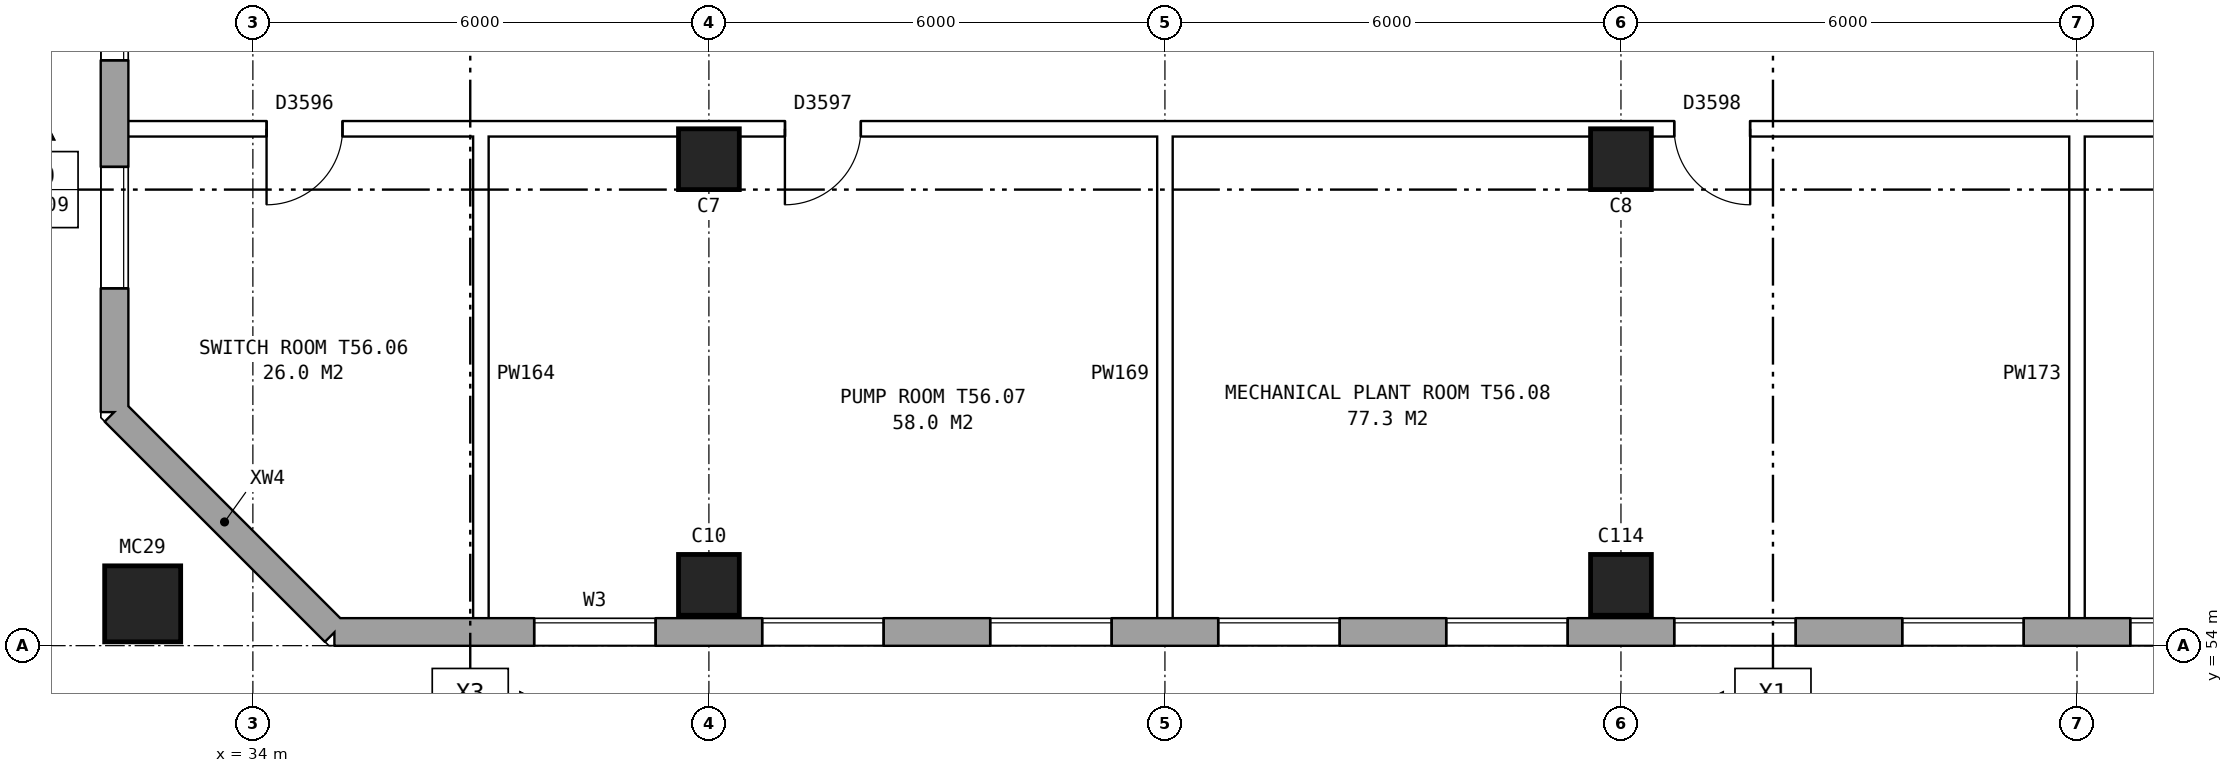
"""IFC4 building model, lengths in metres.
Left out: names, types, materials, properties, quantities, classifications, styles, units other than length and angle.
Written with IfcOpenShell. Run it as: python <this file> out.ifc"""

import sys

from ifc_helpers import new_model, si_unit, direction, frame, frame_2d, origin, origin_2d, place, context, subcontext, project, spatial, rectangle, hollow_rectangle, extrude, element, fill, save


model = new_model("IFC4")
c1 = context("Model", 3, precision=1e-05, world=origin(), true_north=direction((0.0, 1.0)))
c2 = subcontext(c1, "Body", "Model", "MODEL_VIEW")
j1 = project(units=[si_unit("LENGTHUNIT", "METRE"), si_unit("PLANEANGLEUNIT", "RADIAN")], contexts=[c1])
p1 = place(None, origin())
s1 = spatial("IfcSite", under=j1, at=p1, CompositionType="ELEMENT")
p2 = place(p1, origin())
s2 = spatial("IfcBuilding", under=s1, at=p2, CompositionType="ELEMENT")
p3 = place(p2, frame((0.0, 0.0, 198.6)))
s3 = spatial("IfcBuildingStorey", under=s2, at=p3, CompositionType="ELEMENT", Elevation=198.6)
for number, where, z_axis, x_axis in (
    (1, (40.0, 54.8, 0.0), (0.0, 0.0, 1.0), (1.0, 0.0, 0.0)),
    (2, (40.0, 60.4, 0.0), (0.0, 0.0, 1.0), (1.0, 0.0, 0.0)),
    (3, (52.0, 54.8, 0.0), (0.0, 0.0, 1.0), (1.0, 0.0, 0.0)),
    (4, (52.0, 60.4, 0.0), (0.0, 0.0, 1.0), (1.0, 0.0, 0.0)),
):
    element("IfcColumn", number, at=place(p3, frame(where, z_axis=z_axis, x_axis=x_axis)), inside=s3, PredefinedType="COLUMN", context=c2, shape_type="SweptSolid", body=[
        extrude(rectangle(XDim=0.8, YDim=0.8, at=origin_2d()), origin(), (0.0, 0.0, 1.0), 3.7),
    ])
p4 = place(p3, frame((32.55, 54.55, 0.0), z_axis=(0.0, 0.0, 1.0), x_axis=(1.0, 0.0, 0.0)))
e5 = element("IfcColumn", 5, at=p4, inside=s3, PredefinedType="COLUMN", context=c2, shape_type="SweptSolid", body=[
    extrude(hollow_rectangle(XDim=1.0, YDim=1.0, WallThickness=0.055, at=origin_2d()), origin(), (0.0, 0.0, 1.0), 4.2),
])
p5 = place(p3, frame((32.18, 57.075, 0.0), z_axis=(0.0, 0.0, 1.0), x_axis=(0.707106781187, -0.707106781187, 0.0)))
e6 = element("IfcWall", 6, at=p5, inside=s3, PredefinedType="STANDARD", context=c2, shape_type="SweptSolid", body=[
    extrude(rectangle(XDim=4.094, YDim=0.36, at=frame_2d((2.047, 0.0))), origin(), (0.0, 0.0, 1.0), 3.7),
])
p6 = place(p3, frame((35.075, 54.18, 0.0), z_axis=(0.0, 0.0, 1.0), x_axis=(1.0, 0.0, 0.0)))
e7 = element("IfcWall", 7, at=p6, inside=s3, PredefinedType="STANDARD", context=c2, shape_type="SweptSolid", body=[
    extrude(rectangle(XDim=39.875, YDim=0.36, at=frame_2d((19.938, 0.0))), origin(), (0.0, 0.0, 1.0), 3.7),
])
p7 = place(p6, frame((2.625, 0.0, 1.5)))
e8 = element("IfcOpeningElement", 8, at=p7, cuts=e7, PredefinedType="OPENING", context=c2, shape_type="SweptSolid", body=[
    extrude(rectangle(XDim=1.6, YDim=1.2, at=frame_2d((0.8, 0.6))), frame((0.0, 0.19, 0.0), z_axis=(0.0, -1.0, 0.0), x_axis=(1.0, 0.0, 0.0)), (0.0, 0.0, 1.0), 0.38),
])
p8 = place(p6, frame((5.625, 0.0, 1.5)))
e9 = element("IfcOpeningElement", 9, at=p8, cuts=e7, PredefinedType="OPENING", context=c2, shape_type="SweptSolid", body=[
    extrude(rectangle(XDim=1.6, YDim=1.2, at=frame_2d((0.8, 0.6))), frame((0.0, 0.19, 0.0), z_axis=(0.0, -1.0, 0.0), x_axis=(1.0, 0.0, 0.0)), (0.0, 0.0, 1.0), 0.38),
])
p9 = place(p6, frame((8.625, 0.0, 1.5)))
e10 = element("IfcOpeningElement", 10, at=p9, cuts=e7, PredefinedType="OPENING", context=c2, shape_type="SweptSolid", body=[
    extrude(rectangle(XDim=1.6, YDim=1.2, at=frame_2d((0.8, 0.6))), frame((0.0, 0.19, 0.0), z_axis=(0.0, -1.0, 0.0), x_axis=(1.0, 0.0, 0.0)), (0.0, 0.0, 1.0), 0.38),
])
p10 = place(p6, frame((11.625, 0.0, 1.5)))
e11 = element("IfcOpeningElement", 11, at=p10, cuts=e7, PredefinedType="OPENING", context=c2, shape_type="SweptSolid", body=[
    extrude(rectangle(XDim=1.6, YDim=1.2, at=frame_2d((0.8, 0.6))), frame((0.0, 0.19, 0.0), z_axis=(0.0, -1.0, 0.0), x_axis=(1.0, 0.0, 0.0)), (0.0, 0.0, 1.0), 0.38),
])
p11 = place(p6, frame((14.625, 0.0, 1.5)))
e12 = element("IfcOpeningElement", 12, at=p11, cuts=e7, PredefinedType="OPENING", context=c2, shape_type="SweptSolid", body=[
    extrude(rectangle(XDim=1.6, YDim=1.2, at=frame_2d((0.8, 0.6))), frame((0.0, 0.19, 0.0), z_axis=(0.0, -1.0, 0.0), x_axis=(1.0, 0.0, 0.0)), (0.0, 0.0, 1.0), 0.38),
])
p12 = place(p6, frame((17.625, 0.0, 1.5)))
e13 = element("IfcOpeningElement", 13, at=p12, cuts=e7, PredefinedType="OPENING", context=c2, shape_type="SweptSolid", body=[
    extrude(rectangle(XDim=1.6, YDim=1.2, at=frame_2d((0.8, 0.6))), frame((0.0, 0.19, 0.0), z_axis=(0.0, -1.0, 0.0), x_axis=(1.0, 0.0, 0.0)), (0.0, 0.0, 1.0), 0.38),
])
p13 = place(p6, frame((20.625, 0.0, 1.5)))
e14 = element("IfcOpeningElement", 14, at=p13, cuts=e7, PredefinedType="OPENING", context=c2, shape_type="SweptSolid", body=[
    extrude(rectangle(XDim=1.6, YDim=1.2, at=frame_2d((0.8, 0.6))), frame((0.0, 0.19, 0.0), z_axis=(0.0, -1.0, 0.0), x_axis=(1.0, 0.0, 0.0)), (0.0, 0.0, 1.0), 0.38),
])
p14 = place(p6, frame((23.625, 0.0, 1.5)))
e15 = element("IfcOpeningElement", 15, at=p14, cuts=e7, PredefinedType="OPENING", context=c2, shape_type="SweptSolid", body=[
    extrude(rectangle(XDim=1.6, YDim=1.2, at=frame_2d((0.8, 0.6))), frame((0.0, 0.19, 0.0), z_axis=(0.0, -1.0, 0.0), x_axis=(1.0, 0.0, 0.0)), (0.0, 0.0, 1.0), 0.38),
])
p15 = place(p6, frame((26.625, 0.0, 1.5)))
e16 = element("IfcOpeningElement", 16, at=p15, cuts=e7, PredefinedType="OPENING", context=c2, shape_type="SweptSolid", body=[
    extrude(rectangle(XDim=1.6, YDim=1.2, at=frame_2d((0.8, 0.6))), frame((0.0, 0.19, 0.0), z_axis=(0.0, -1.0, 0.0), x_axis=(1.0, 0.0, 0.0)), (0.0, 0.0, 1.0), 0.38),
])
p16 = place(p6, frame((29.625, 0.0, 1.5)))
e17 = element("IfcOpeningElement", 17, at=p16, cuts=e7, PredefinedType="OPENING", context=c2, shape_type="SweptSolid", body=[
    extrude(rectangle(XDim=1.6, YDim=1.2, at=frame_2d((0.8, 0.6))), frame((0.0, 0.19, 0.0), z_axis=(0.0, -1.0, 0.0), x_axis=(1.0, 0.0, 0.0)), (0.0, 0.0, 1.0), 0.38),
])
p17 = place(p6, frame((32.625, 0.0, 1.5)))
e18 = element("IfcOpeningElement", 18, at=p17, cuts=e7, PredefinedType="OPENING", context=c2, shape_type="SweptSolid", body=[
    extrude(rectangle(XDim=1.6, YDim=1.2, at=frame_2d((0.8, 0.6))), frame((0.0, 0.19, 0.0), z_axis=(0.0, -1.0, 0.0), x_axis=(1.0, 0.0, 0.0)), (0.0, 0.0, 1.0), 0.38),
])
p18 = place(p6, frame((35.625, 0.0, 1.5)))
e19 = element("IfcOpeningElement", 19, at=p18, cuts=e7, PredefinedType="OPENING", context=c2, shape_type="SweptSolid", body=[
    extrude(rectangle(XDim=1.6, YDim=1.2, at=frame_2d((0.8, 0.6))), frame((0.0, 0.19, 0.0), z_axis=(0.0, -1.0, 0.0), x_axis=(1.0, 0.0, 0.0)), (0.0, 0.0, 1.0), 0.38),
])
p19 = place(p3, frame((32.18, 82.925, 0.0), z_axis=(0.0, 0.0, 1.0), x_axis=(0.0, -1.0, 0.0)))
e20 = element("IfcWall", 20, at=p19, inside=s3, PredefinedType="STANDARD", context=c2, shape_type="SweptSolid", body=[
    extrude(rectangle(XDim=25.851, YDim=0.36, at=frame_2d((12.925, 0.0))), origin(), (0.0, 0.0, 1.0), 3.7),
])
p20 = place(p19, frame((1.625, 0.0, 1.5)))
e21 = element("IfcOpeningElement", 21, at=p20, cuts=e20, PredefinedType="OPENING", context=c2, shape_type="SweptSolid", body=[
    extrude(rectangle(XDim=1.6, YDim=1.2, at=frame_2d((0.8, 0.6))), frame((0.0, 0.19, 0.0), z_axis=(0.0, -1.0, 0.0), x_axis=(1.0, 0.0, 0.0)), (0.0, 0.0, 1.0), 0.38),
])
p21 = place(p19, frame((4.625, 0.0, 1.5)))
e22 = element("IfcOpeningElement", 22, at=p21, cuts=e20, PredefinedType="OPENING", context=c2, shape_type="SweptSolid", body=[
    extrude(rectangle(XDim=1.6, YDim=1.2, at=frame_2d((0.8, 0.6))), frame((0.0, 0.19, 0.0), z_axis=(0.0, -1.0, 0.0), x_axis=(1.0, 0.0, 0.0)), (0.0, 0.0, 1.0), 0.38),
])
p22 = place(p19, frame((19.625, 0.0, 1.5)))
e23 = element("IfcOpeningElement", 23, at=p22, cuts=e20, PredefinedType="OPENING", context=c2, shape_type="SweptSolid", body=[
    extrude(rectangle(XDim=1.6, YDim=1.2, at=frame_2d((0.8, 0.6))), frame((0.0, 0.19, 0.0), z_axis=(0.0, -1.0, 0.0), x_axis=(1.0, 0.0, 0.0)), (0.0, 0.0, 1.0), 0.38),
])
p23 = place(p19, frame((22.625, 0.0, 1.5)))
e24 = element("IfcOpeningElement", 24, at=p23, cuts=e20, PredefinedType="OPENING", context=c2, shape_type="SweptSolid", body=[
    extrude(rectangle(XDim=1.6, YDim=1.2, at=frame_2d((0.8, 0.6))), frame((0.0, 0.19, 0.0), z_axis=(0.0, -1.0, 0.0), x_axis=(1.0, 0.0, 0.0)), (0.0, 0.0, 1.0), 0.38),
])
p24 = place(p3, frame((32.24, 60.8, 0.0), z_axis=(0.0, 0.0, 1.0), x_axis=(1.0, 0.0, 0.0)))
e25 = element("IfcWall", 25, at=p24, inside=s3, PredefinedType="PARTITIONING", context=c2, shape_type="SweptSolid", body=[
    extrude(rectangle(XDim=136.52, YDim=0.2, at=frame_2d((68.26, 0.0))), origin(), (0.0, 0.0, 1.0), 3.7),
])
p25 = place(p24, frame((1.94, 0.0, 0.0)))
e26 = element("IfcOpeningElement", 26, at=p25, cuts=e25, PredefinedType="OPENING", context=c2, shape_type="SweptSolid", body=[
    extrude(rectangle(XDim=1.0, YDim=2.1, at=frame_2d((0.5, 1.05))), frame((0.0, 0.11, 0.0), z_axis=(0.0, -1.0, 0.0), x_axis=(1.0, 0.0, 0.0)), (0.0, 0.0, 1.0), 0.22),
])
p26 = place(p24, frame((8.76, 0.0, 0.0)))
e27 = element("IfcOpeningElement", 27, at=p26, cuts=e25, PredefinedType="OPENING", context=c2, shape_type="SweptSolid", body=[
    extrude(rectangle(XDim=1.0, YDim=2.1, at=frame_2d((0.5, 1.05))), frame((0.0, 0.11, 0.0), z_axis=(0.0, -1.0, 0.0), x_axis=(1.0, 0.0, 0.0)), (0.0, 0.0, 1.0), 0.22),
])
p27 = place(p24, frame((20.46, 0.0, 0.0)))
e28 = element("IfcOpeningElement", 28, at=p27, cuts=e25, PredefinedType="OPENING", context=c2, shape_type="SweptSolid", body=[
    extrude(rectangle(XDim=1.0, YDim=2.1, at=frame_2d((0.5, 1.05))), frame((0.0, 0.11, 0.0), z_axis=(0.0, -1.0, 0.0), x_axis=(1.0, 0.0, 0.0)), (0.0, 0.0, 1.0), 0.22),
])
p28 = place(p24, frame((30.06, 0.0, 0.0)))
e29 = element("IfcOpeningElement", 29, at=p28, cuts=e25, PredefinedType="OPENING", context=c2, shape_type="SweptSolid", body=[
    extrude(rectangle(XDim=1.0, YDim=2.1, at=frame_2d((0.5, 1.05))), frame((0.0, 0.11, 0.0), z_axis=(0.0, -1.0, 0.0), x_axis=(1.0, 0.0, 0.0)), (0.0, 0.0, 1.0), 0.22),
])
p29 = place(p24, frame((40.08, 0.0, 0.0)))
e30 = element("IfcOpeningElement", 30, at=p29, cuts=e25, PredefinedType="OPENING", context=c2, shape_type="SweptSolid", body=[
    extrude(rectangle(XDim=1.0, YDim=2.1, at=frame_2d((0.5, 1.05))), frame((0.0, 0.11, 0.0), z_axis=(0.0, -1.0, 0.0), x_axis=(1.0, 0.0, 0.0)), (0.0, 0.0, 1.0), 0.22),
])
p30 = place(p24, frame((46.517, 0.0, 0.0)))
e31 = element("IfcOpeningElement", 31, at=p30, cuts=e25, PredefinedType="OPENING", context=c2, shape_type="SweptSolid", body=[
    extrude(rectangle(XDim=1.0, YDim=2.1, at=frame_2d((0.5, 1.05))), frame((0.0, 0.11, 0.0), z_axis=(0.0, -1.0, 0.0), x_axis=(1.0, 0.0, 0.0)), (0.0, 0.0, 1.0), 0.22),
])
p31 = place(p24, frame((57.01, 0.0, 0.0)))
e32 = element("IfcOpeningElement", 32, at=p31, cuts=e25, PredefinedType="OPENING", context=c2, shape_type="SweptSolid", body=[
    extrude(rectangle(XDim=1.0, YDim=2.1, at=frame_2d((0.5, 1.05))), frame((0.0, 0.11, 0.0), z_axis=(0.0, -1.0, 0.0), x_axis=(1.0, 0.0, 0.0)), (0.0, 0.0, 1.0), 0.22),
])
p32 = place(p24, frame((70.76, 0.0, 0.0)))
e33 = element("IfcOpeningElement", 33, at=p32, cuts=e25, PredefinedType="OPENING", context=c2, shape_type="SweptSolid", body=[
    extrude(rectangle(XDim=1.0, YDim=2.1, at=frame_2d((0.5, 1.05))), frame((0.0, 0.11, 0.0), z_axis=(0.0, -1.0, 0.0), x_axis=(1.0, 0.0, 0.0)), (0.0, 0.0, 1.0), 0.22),
])
p33 = place(p24, frame((84.51, 0.0, 0.0)))
e34 = element("IfcOpeningElement", 34, at=p33, cuts=e25, PredefinedType="OPENING", context=c2, shape_type="SweptSolid", body=[
    extrude(rectangle(XDim=1.0, YDim=2.1, at=frame_2d((0.5, 1.05))), frame((0.0, 0.11, 0.0), z_axis=(0.0, -1.0, 0.0), x_axis=(1.0, 0.0, 0.0)), (0.0, 0.0, 1.0), 0.22),
])
p34 = place(p24, frame((95.003, 0.0, 0.0)))
e35 = element("IfcOpeningElement", 35, at=p34, cuts=e25, PredefinedType="OPENING", context=c2, shape_type="SweptSolid", body=[
    extrude(rectangle(XDim=1.0, YDim=2.1, at=frame_2d((0.5, 1.05))), frame((0.0, 0.11, 0.0), z_axis=(0.0, -1.0, 0.0), x_axis=(1.0, 0.0, 0.0)), (0.0, 0.0, 1.0), 0.22),
])
p35 = place(p24, frame((101.44, 0.0, 0.0)))
e36 = element("IfcOpeningElement", 36, at=p35, cuts=e25, PredefinedType="OPENING", context=c2, shape_type="SweptSolid", body=[
    extrude(rectangle(XDim=1.0, YDim=2.1, at=frame_2d((0.5, 1.05))), frame((0.0, 0.11, 0.0), z_axis=(0.0, -1.0, 0.0), x_axis=(1.0, 0.0, 0.0)), (0.0, 0.0, 1.0), 0.22),
])
p36 = place(p24, frame((111.56, 0.0, 0.0)))
e37 = element("IfcOpeningElement", 37, at=p36, cuts=e25, PredefinedType="OPENING", context=c2, shape_type="SweptSolid", body=[
    extrude(rectangle(XDim=1.0, YDim=2.1, at=frame_2d((0.5, 1.05))), frame((0.0, 0.11, 0.0), z_axis=(0.0, -1.0, 0.0), x_axis=(1.0, 0.0, 0.0)), (0.0, 0.0, 1.0), 0.22),
])
p37 = place(p24, frame((123.56, 0.0, 0.0)))
e38 = element("IfcOpeningElement", 38, at=p37, cuts=e25, PredefinedType="OPENING", context=c2, shape_type="SweptSolid", body=[
    extrude(rectangle(XDim=1.0, YDim=2.1, at=frame_2d((0.5, 1.05))), frame((0.0, 0.11, 0.0), z_axis=(0.0, -1.0, 0.0), x_axis=(1.0, 0.0, 0.0)), (0.0, 0.0, 1.0), 0.22),
])
p38 = place(p24, frame((132.08, 0.0, 0.0)))
e39 = element("IfcOpeningElement", 39, at=p38, cuts=e25, PredefinedType="OPENING", context=c2, shape_type="SweptSolid", body=[
    extrude(rectangle(XDim=1.0, YDim=2.1, at=frame_2d((0.5, 1.05))), frame((0.0, 0.11, 0.0), z_axis=(0.0, -1.0, 0.0), x_axis=(1.0, 0.0, 0.0)), (0.0, 0.0, 1.0), 0.22),
])
for number, where, z_axis, x_axis in (
    (40, (37.0, 54.24, 0.0), (0.0, 0.0, 1.0), (0.0, 1.0, 0.0)),
    (41, (46.0, 54.24, 0.0), (0.0, 0.0, 1.0), (0.0, 1.0, 0.0)),
    (42, (58.0, 54.24, 0.0), (0.0, 0.0, 1.0), (0.0, 1.0, 0.0)),
):
    element("IfcWall", number, at=place(p3, frame(where, z_axis=z_axis, x_axis=x_axis)), inside=s3, PredefinedType="PARTITIONING", context=c2, shape_type="SweptSolid", body=[
        extrude(rectangle(XDim=6.66, YDim=0.2, at=frame_2d((3.33, 0.0))), origin(), (0.0, 0.0, 1.0), 3.7),
    ])
p39 = place(p7, origin())
e43 = element("IfcWindow", 43, at=p39, inside=s3, PartitioningType="DOUBLE_PANEL_HORIZONTAL", PredefinedType="WINDOW", context=c2, shape_type="SweptSolid", body=[
    extrude(rectangle(XDim=1.6, YDim=1.2, at=frame_2d((0.8, 0.6))), frame((0.0, 0.15, 0.0), z_axis=(0.0, -1.0, 0.0), x_axis=(1.0, 0.0, 0.0)), (0.0, 0.0, 1.0), 0.06),
])
fill(e8, e43)
p40 = place(p8, origin())
e44 = element("IfcWindow", 44, at=p40, inside=s3, PartitioningType="DOUBLE_PANEL_HORIZONTAL", PredefinedType="WINDOW", context=c2, shape_type="SweptSolid", body=[
    extrude(rectangle(XDim=1.6, YDim=1.2, at=frame_2d((0.8, 0.6))), frame((0.0, 0.15, 0.0), z_axis=(0.0, -1.0, 0.0), x_axis=(1.0, 0.0, 0.0)), (0.0, 0.0, 1.0), 0.06),
])
fill(e9, e44)
p41 = place(p9, origin())
e45 = element("IfcWindow", 45, at=p41, inside=s3, PartitioningType="DOUBLE_PANEL_HORIZONTAL", PredefinedType="WINDOW", context=c2, shape_type="SweptSolid", body=[
    extrude(rectangle(XDim=1.6, YDim=1.2, at=frame_2d((0.8, 0.6))), frame((0.0, 0.15, 0.0), z_axis=(0.0, -1.0, 0.0), x_axis=(1.0, 0.0, 0.0)), (0.0, 0.0, 1.0), 0.06),
])
fill(e10, e45)
p42 = place(p10, origin())
e46 = element("IfcWindow", 46, at=p42, inside=s3, PartitioningType="DOUBLE_PANEL_HORIZONTAL", PredefinedType="WINDOW", context=c2, shape_type="SweptSolid", body=[
    extrude(rectangle(XDim=1.6, YDim=1.2, at=frame_2d((0.8, 0.6))), frame((0.0, 0.15, 0.0), z_axis=(0.0, -1.0, 0.0), x_axis=(1.0, 0.0, 0.0)), (0.0, 0.0, 1.0), 0.06),
])
fill(e11, e46)
p43 = place(p11, origin())
e47 = element("IfcWindow", 47, at=p43, inside=s3, PartitioningType="DOUBLE_PANEL_HORIZONTAL", PredefinedType="WINDOW", context=c2, shape_type="SweptSolid", body=[
    extrude(rectangle(XDim=1.6, YDim=1.2, at=frame_2d((0.8, 0.6))), frame((0.0, 0.15, 0.0), z_axis=(0.0, -1.0, 0.0), x_axis=(1.0, 0.0, 0.0)), (0.0, 0.0, 1.0), 0.06),
])
fill(e12, e47)
p44 = place(p12, origin())
e48 = element("IfcWindow", 48, at=p44, inside=s3, PartitioningType="DOUBLE_PANEL_HORIZONTAL", PredefinedType="WINDOW", context=c2, shape_type="SweptSolid", body=[
    extrude(rectangle(XDim=1.6, YDim=1.2, at=frame_2d((0.8, 0.6))), frame((0.0, 0.15, 0.0), z_axis=(0.0, -1.0, 0.0), x_axis=(1.0, 0.0, 0.0)), (0.0, 0.0, 1.0), 0.06),
])
fill(e13, e48)
p45 = place(p13, origin())
e49 = element("IfcWindow", 49, at=p45, inside=s3, PartitioningType="DOUBLE_PANEL_HORIZONTAL", PredefinedType="WINDOW", context=c2, shape_type="SweptSolid", body=[
    extrude(rectangle(XDim=1.6, YDim=1.2, at=frame_2d((0.8, 0.6))), frame((0.0, 0.15, 0.0), z_axis=(0.0, -1.0, 0.0), x_axis=(1.0, 0.0, 0.0)), (0.0, 0.0, 1.0), 0.06),
])
fill(e14, e49)
p46 = place(p14, origin())
e50 = element("IfcWindow", 50, at=p46, inside=s3, PartitioningType="DOUBLE_PANEL_HORIZONTAL", PredefinedType="WINDOW", context=c2, shape_type="SweptSolid", body=[
    extrude(rectangle(XDim=1.6, YDim=1.2, at=frame_2d((0.8, 0.6))), frame((0.0, 0.15, 0.0), z_axis=(0.0, -1.0, 0.0), x_axis=(1.0, 0.0, 0.0)), (0.0, 0.0, 1.0), 0.06),
])
fill(e15, e50)
p47 = place(p22, origin())
e51 = element("IfcWindow", 51, at=p47, inside=s3, PartitioningType="DOUBLE_PANEL_HORIZONTAL", PredefinedType="WINDOW", context=c2, shape_type="SweptSolid", body=[
    extrude(rectangle(XDim=1.6, YDim=1.2, at=frame_2d((0.8, 0.6))), frame((0.0, 0.15, 0.0), z_axis=(0.0, -1.0, 0.0), x_axis=(1.0, 0.0, 0.0)), (0.0, 0.0, 1.0), 0.06),
])
fill(e23, e51)
p48 = place(p23, origin())
e52 = element("IfcWindow", 52, at=p48, inside=s3, PartitioningType="DOUBLE_PANEL_HORIZONTAL", PredefinedType="WINDOW", context=c2, shape_type="SweptSolid", body=[
    extrude(rectangle(XDim=1.6, YDim=1.2, at=frame_2d((0.8, 0.6))), frame((0.0, 0.15, 0.0), z_axis=(0.0, -1.0, 0.0), x_axis=(1.0, 0.0, 0.0)), (0.0, 0.0, 1.0), 0.06),
])
fill(e24, e52)
p49 = place(p25, frame((1.0, 0.0, 0.0), z_axis=(0.0, 0.0, 1.0), x_axis=(-1.0, 0.0, 0.0)))
e53 = element("IfcDoor", 53, at=p49, inside=s3, OperationType="SINGLE_SWING_RIGHT", PredefinedType="DOOR", context=c2, shape_type="SweptSolid", body=[
    extrude(rectangle(XDim=1.0, YDim=2.1, at=frame_2d((0.5, 1.05))), frame((0.0, 0.025, 0.0), z_axis=(0.0, -1.0, 0.0), x_axis=(1.0, 0.0, 0.0)), (0.0, 0.0, 1.0), 0.05),
])
fill(e26, e53)
p50 = place(p26, frame((1.0, 0.0, 0.0), z_axis=(0.0, 0.0, 1.0), x_axis=(-1.0, 0.0, 0.0)))
e54 = element("IfcDoor", 54, at=p50, inside=s3, OperationType="SINGLE_SWING_RIGHT", PredefinedType="DOOR", context=c2, shape_type="SweptSolid", body=[
    extrude(rectangle(XDim=1.0, YDim=2.1, at=frame_2d((0.5, 1.05))), frame((0.0, 0.025, 0.0), z_axis=(0.0, -1.0, 0.0), x_axis=(1.0, 0.0, 0.0)), (0.0, 0.0, 1.0), 0.05),
])
fill(e27, e54)
p51 = place(p27, frame((1.0, 0.0, 0.0), z_axis=(0.0, 0.0, 1.0), x_axis=(-1.0, 0.0, 0.0)))
e55 = element("IfcDoor", 55, at=p51, inside=s3, OperationType="SINGLE_SWING_LEFT", PredefinedType="DOOR", context=c2, shape_type="SweptSolid", body=[
    extrude(rectangle(XDim=1.0, YDim=2.1, at=frame_2d((0.5, 1.05))), frame((0.0, 0.025, 0.0), z_axis=(0.0, -1.0, 0.0), x_axis=(1.0, 0.0, 0.0)), (0.0, 0.0, 1.0), 0.05),
])
fill(e28, e55)
save(model, sys.argv[1])
